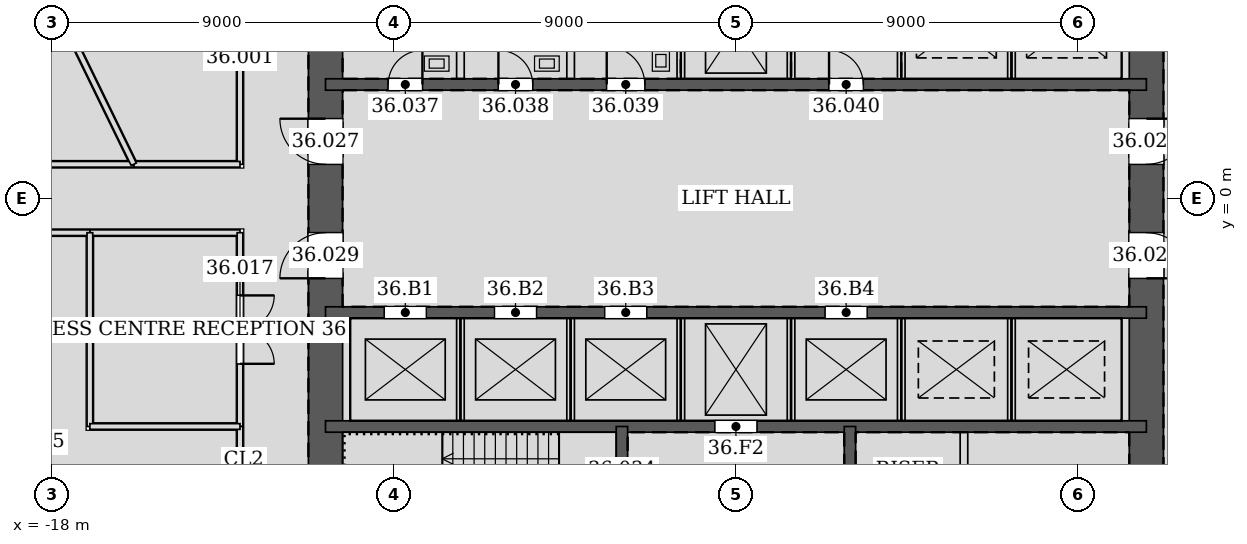
"""IFC4 building model, lengths in metres.
Left out: names, types, materials, properties, quantities, classifications, styles, units other than length and angle.
Written with IfcOpenShell. Run it as: python <this file> out.ifc"""

import sys

from ifc_helpers import new_model, si_unit, direction, frame, frame_2d, origin, place, context, subcontext, project, spatial, rectangle, extrude, element, fill, save


model = new_model("IFC4")
c1 = context("Model", 3, precision=1e-05, world=origin(), true_north=direction((0.0, 1.0)))
c2 = subcontext(c1, "Body", "Model", "MODEL_VIEW")
j1 = project(units=[si_unit("LENGTHUNIT", "METRE"), si_unit("PLANEANGLEUNIT", "RADIAN")], contexts=[c1])
p1 = place(None, origin())
s1 = spatial("IfcSite", under=j1, at=p1, CompositionType="ELEMENT")
p2 = place(p1, origin())
s2 = spatial("IfcBuilding", under=s1, at=p2, CompositionType="ELEMENT")
p3 = place(p2, frame((0.0, 0.0, 159.6)))
s3 = spatial("IfcBuildingStorey", under=s2, at=p3, CompositionType="ELEMENT", Elevation=159.6)
p4 = place(p3, frame((10.8, -10.8, 0.0), z_axis=(0.0, 0.0, 1.0), x_axis=(0.0, 1.0, 0.0)))
e1 = element("IfcWall", 1, at=p4, inside=s3, PredefinedType="SOLIDWALL", context=c2, shape_type="SweptSolid", body=[
    extrude(rectangle(XDim=21.6, YDim=0.9, at=frame_2d((10.8, 0.0))), origin(), (0.0, 0.0, 1.0), 4.2),
])
p5 = place(p4, frame((11.7, 0.0, 0.0)))
e2 = element("IfcOpeningElement", 2, at=p5, cuts=e1, PredefinedType="OPENING", context=c2, shape_type="SweptSolid", body=[
    extrude(rectangle(XDim=1.2, YDim=2.1, at=frame_2d((0.6, 1.05))), frame((0.0, 0.46, 0.0), z_axis=(0.0, -1.0, 0.0), x_axis=(1.0, 0.0, 0.0)), (0.0, 0.0, 1.0), 0.92),
])
p6 = place(p4, frame((8.7, 0.0, 0.0)))
e3 = element("IfcOpeningElement", 3, at=p6, cuts=e1, PredefinedType="OPENING", context=c2, shape_type="SweptSolid", body=[
    extrude(rectangle(XDim=1.2, YDim=2.1, at=frame_2d((0.6, 1.05))), frame((0.0, 0.46, 0.0), z_axis=(0.0, -1.0, 0.0), x_axis=(1.0, 0.0, 0.0)), (0.0, 0.0, 1.0), 0.92),
])
p7 = place(p3, frame((-10.8, 10.8, 0.0), z_axis=(0.0, 0.0, 1.0), x_axis=(0.0, -1.0, 0.0)))
e4 = element("IfcWall", 4, at=p7, inside=s3, PredefinedType="SOLIDWALL", context=c2, shape_type="SweptSolid", body=[
    extrude(rectangle(XDim=21.6, YDim=0.9, at=frame_2d((10.8, 0.0))), origin(), (0.0, 0.0, 1.0), 4.2),
])
p8 = place(p7, frame((8.7, 0.0, 0.0)))
e5 = element("IfcOpeningElement", 5, at=p8, cuts=e4, PredefinedType="OPENING", context=c2, shape_type="SweptSolid", body=[
    extrude(rectangle(XDim=1.2, YDim=2.1, at=frame_2d((0.6, 1.05))), frame((0.0, 0.46, 0.0), z_axis=(0.0, -1.0, 0.0), x_axis=(1.0, 0.0, 0.0)), (0.0, 0.0, 1.0), 0.92),
])
p9 = place(p7, frame((11.7, 0.0, 0.0)))
e6 = element("IfcOpeningElement", 6, at=p9, cuts=e4, PredefinedType="OPENING", context=c2, shape_type="SweptSolid", body=[
    extrude(rectangle(XDim=1.2, YDim=2.1, at=frame_2d((0.6, 1.05))), frame((0.0, 0.46, 0.0), z_axis=(0.0, -1.0, 0.0), x_axis=(1.0, 0.0, 0.0)), (0.0, 0.0, 1.0), 0.92),
])
p10 = place(p3, frame((-10.8, 3.0, 0.0), z_axis=(0.0, 0.0, 1.0), x_axis=(1.0, 0.0, 0.0)))
e7 = element("IfcWall", 7, at=p10, inside=s3, PredefinedType="SOLIDWALL", context=c2, shape_type="SweptSolid", body=[
    extrude(rectangle(XDim=21.6, YDim=0.3, at=frame_2d((10.8, 0.0))), origin(), (0.0, 0.0, 1.0), 4.2),
])
p11 = place(p10, frame((1.65, 0.0, 0.0)))
e8 = element("IfcOpeningElement", 8, at=p11, cuts=e7, PredefinedType="OPENING", context=c2, shape_type="SweptSolid", body=[
    extrude(rectangle(XDim=0.9, YDim=2.1, at=frame_2d((0.45, 1.05))), frame((0.0, 0.16, 0.0), z_axis=(0.0, -1.0, 0.0), x_axis=(1.0, 0.0, 0.0)), (0.0, 0.0, 1.0), 0.32),
])
p12 = place(p10, frame((4.55, 0.0, 0.0)))
e9 = element("IfcOpeningElement", 9, at=p12, cuts=e7, PredefinedType="OPENING", context=c2, shape_type="SweptSolid", body=[
    extrude(rectangle(XDim=0.9, YDim=2.1, at=frame_2d((0.45, 1.05))), frame((0.0, 0.16, 0.0), z_axis=(0.0, -1.0, 0.0), x_axis=(1.0, 0.0, 0.0)), (0.0, 0.0, 1.0), 0.32),
])
p13 = place(p10, frame((7.4, 0.0, 0.0)))
e10 = element("IfcOpeningElement", 10, at=p13, cuts=e7, PredefinedType="OPENING", context=c2, shape_type="SweptSolid", body=[
    extrude(rectangle(XDim=1.0, YDim=2.1, at=frame_2d((0.5, 1.05))), frame((0.0, 0.16, 0.0), z_axis=(0.0, -1.0, 0.0), x_axis=(1.0, 0.0, 0.0)), (0.0, 0.0, 1.0), 0.32),
])
p14 = place(p10, frame((13.25, 0.0, 0.0)))
e11 = element("IfcOpeningElement", 11, at=p14, cuts=e7, PredefinedType="OPENING", context=c2, shape_type="SweptSolid", body=[
    extrude(rectangle(XDim=0.9, YDim=2.1, at=frame_2d((0.45, 1.05))), frame((0.0, 0.16, 0.0), z_axis=(0.0, -1.0, 0.0), x_axis=(1.0, 0.0, 0.0)), (0.0, 0.0, 1.0), 0.32),
])
p15 = place(p3, frame((-10.8, -3.0, 0.0), z_axis=(0.0, 0.0, 1.0), x_axis=(1.0, 0.0, 0.0)))
e12 = element("IfcWall", 12, at=p15, inside=s3, PredefinedType="SOLIDWALL", context=c2, shape_type="SweptSolid", body=[
    extrude(rectangle(XDim=21.6, YDim=0.3, at=frame_2d((10.8, 0.0))), origin(), (0.0, 0.0, 1.0), 4.2),
])
p16 = place(p15, frame((1.55, 0.0, 0.0)))
e13 = element("IfcOpeningElement", 13, at=p16, cuts=e12, PredefinedType="OPENING", context=c2, shape_type="SweptSolid", body=[
    extrude(rectangle(XDim=1.1, YDim=2.1, at=frame_2d((0.55, 1.05))), frame((0.0, 0.16, 0.0), z_axis=(0.0, -1.0, 0.0), x_axis=(1.0, 0.0, 0.0)), (0.0, 0.0, 1.0), 0.32),
])
p17 = place(p15, frame((4.45, 0.0, 0.0)))
e14 = element("IfcOpeningElement", 14, at=p17, cuts=e12, PredefinedType="OPENING", context=c2, shape_type="SweptSolid", body=[
    extrude(rectangle(XDim=1.1, YDim=2.1, at=frame_2d((0.55, 1.05))), frame((0.0, 0.16, 0.0), z_axis=(0.0, -1.0, 0.0), x_axis=(1.0, 0.0, 0.0)), (0.0, 0.0, 1.0), 0.32),
])
p18 = place(p15, frame((7.35, 0.0, 0.0)))
e15 = element("IfcOpeningElement", 15, at=p18, cuts=e12, PredefinedType="OPENING", context=c2, shape_type="SweptSolid", body=[
    extrude(rectangle(XDim=1.1, YDim=2.1, at=frame_2d((0.55, 1.05))), frame((0.0, 0.16, 0.0), z_axis=(0.0, -1.0, 0.0), x_axis=(1.0, 0.0, 0.0)), (0.0, 0.0, 1.0), 0.32),
])
p19 = place(p15, frame((13.15, 0.0, 0.0)))
e16 = element("IfcOpeningElement", 16, at=p19, cuts=e12, PredefinedType="OPENING", context=c2, shape_type="SweptSolid", body=[
    extrude(rectangle(XDim=1.1, YDim=2.1, at=frame_2d((0.55, 1.05))), frame((0.0, 0.16, 0.0), z_axis=(0.0, -1.0, 0.0), x_axis=(1.0, 0.0, 0.0)), (0.0, 0.0, 1.0), 0.32),
])
p20 = place(p3, frame((-10.8, -6.0, 0.0), z_axis=(0.0, 0.0, 1.0), x_axis=(1.0, 0.0, 0.0)))
e17 = element("IfcWall", 17, at=p20, inside=s3, PredefinedType="SOLIDWALL", context=c2, shape_type="SweptSolid", body=[
    extrude(rectangle(XDim=21.6, YDim=0.3, at=frame_2d((10.8, 0.0))), origin(), (0.0, 0.0, 1.0), 4.2),
])
p21 = place(p20, frame((10.25, 0.0, 0.0)))
e18 = element("IfcOpeningElement", 18, at=p21, cuts=e17, PredefinedType="OPENING", context=c2, shape_type="SweptSolid", body=[
    extrude(rectangle(XDim=1.1, YDim=2.1, at=frame_2d((0.55, 1.05))), frame((0.0, 0.16, 0.0), z_axis=(0.0, -1.0, 0.0), x_axis=(1.0, 0.0, 0.0)), (0.0, 0.0, 1.0), 0.32),
])
p22 = place(p3, frame((-3.0, -6.0, 0.0), z_axis=(0.0, 0.0, 1.0), x_axis=(0.0, -1.0, 0.0)))
e19 = element("IfcWall", 19, at=p22, inside=s3, PredefinedType="SOLIDWALL", context=c2, shape_type="SweptSolid", body=[
    extrude(rectangle(XDim=4.8, YDim=0.3, at=frame_2d((2.4, 0.0))), origin(), (0.0, 0.0, 1.0), 4.2),
])
p23 = place(p22, frame((1.75, 0.0, 0.0)))
e20 = element("IfcOpeningElement", 20, at=p23, cuts=e19, PredefinedType="OPENING", context=c2, shape_type="SweptSolid", body=[
    extrude(rectangle(XDim=1.0, YDim=2.1, at=frame_2d((0.5, 1.05))), frame((0.0, 0.16, 0.0), z_axis=(0.0, -1.0, 0.0), x_axis=(1.0, 0.0, 0.0)), (0.0, 0.0, 1.0), 0.32),
])
p24 = place(p3, frame((3.0, -6.0, 0.0), z_axis=(0.0, 0.0, 1.0), x_axis=(0.0, -1.0, 0.0)))
e21 = element("IfcWall", 21, at=p24, inside=s3, PredefinedType="SOLIDWALL", context=c2, shape_type="SweptSolid", body=[
    extrude(rectangle(XDim=4.8, YDim=0.3, at=frame_2d((2.4, 0.0))), origin(), (0.0, 0.0, 1.0), 4.2),
])
p25 = place(p3, frame((-13.05, 8.701, 0.0), z_axis=(0.0, 0.0, 1.0), x_axis=(0.0, -1.0, 0.0)))
e22 = element("IfcWall", 22, at=p25, inside=s3, PredefinedType="PARTITIONING", context=c2, shape_type="SweptSolid", body=[
    extrude(rectangle(XDim=7.801, YDim=0.15, at=frame_2d((3.9, 0.0))), origin(), (0.0, 0.0, 1.0), 4.035),
])
p26 = place(p25, frame((3.4, 0.0, 0.0)))
e23 = element("IfcOpeningElement", 23, at=p26, cuts=e22, PredefinedType="OPENING", context=c2, shape_type="SweptSolid", body=[
    extrude(rectangle(XDim=1.0, YDim=2.1, at=frame_2d((0.5, 1.05))), frame((0.0, 0.085, 0.0), z_axis=(0.0, -1.0, 0.0), x_axis=(1.0, 0.0, 0.0)), (0.0, 0.0, 1.0), 0.17),
])
p27 = place(p3, frame((-13.05, 0.9, 0.0), z_axis=(0.0, 0.0, 1.0), x_axis=(-1.0, 0.0, 0.0)))
e24 = element("IfcWall", 24, at=p27, inside=s3, PredefinedType="PARTITIONING", context=c2, shape_type="SweptSolid", body=[
    extrude(rectangle(XDim=2.797, YDim=0.15, at=frame_2d((1.398, 0.0))), origin(), (0.0, 0.0, 1.0), 3.491),
])
p28 = place(p3, frame((-17.001, -0.9, 0.0), z_axis=(0.0, 0.0, 1.0), x_axis=(1.0, 0.0, 0.0)))
e25 = element("IfcWall", 25, at=p28, inside=s3, PredefinedType="PARTITIONING", context=c2, shape_type="SweptSolid", body=[
    extrude(rectangle(XDim=3.951, YDim=0.15, at=frame_2d((1.976, 0.0))), origin(), (0.0, 0.0, 1.0), 3.491),
])
p29 = place(p3, frame((-13.05, -0.9, 0.0), z_axis=(0.0, 0.0, 1.0), x_axis=(0.0, -1.0, 0.0)))
e26 = element("IfcWall", 26, at=p29, inside=s3, PredefinedType="PARTITIONING", context=c2, shape_type="SweptSolid", body=[
    extrude(rectangle(XDim=5.101, YDim=0.15, at=frame_2d((2.551, 0.0))), origin(), (0.0, 0.0, 1.0), 4.035),
])
p30 = place(p29, frame((1.65, 0.0, 0.0)))
e27 = element("IfcOpeningElement", 27, at=p30, cuts=e26, PredefinedType="OPENING", context=c2, shape_type="SweptSolid", body=[
    extrude(rectangle(XDim=1.8, YDim=2.4, at=frame_2d((0.9, 1.2))), frame((0.0, 0.085, 0.0), z_axis=(0.0, -1.0, 0.0), x_axis=(1.0, 0.0, 0.0)), (0.0, 0.0, 1.0), 0.17),
])
p31 = place(p3, frame((-15.844, 0.9, 0.0), z_axis=(0.0, 0.0, 1.0), x_axis=(-1.0, 0.0, 0.0)))
e28 = element("IfcWall", 28, at=p31, inside=s3, PredefinedType="PARTITIONING", context=c2, shape_type="SweptSolid", body=[
    extrude(rectangle(XDim=7.639, YDim=0.15, at=frame_2d((3.82, 0.0))), origin(), (0.0, 0.0, 1.0), 3.423),
])
p32 = place(p31, frame((2.703, 0.0, 0.0)))
e29 = element("IfcOpeningElement", 29, at=p32, cuts=e28, PredefinedType="OPENING", context=c2, shape_type="SweptSolid", body=[
    extrude(rectangle(XDim=1.8, YDim=2.4, at=frame_2d((0.9, 1.2))), frame((0.0, 0.085, 0.0), z_axis=(0.0, -1.0, 0.0), x_axis=(1.0, 0.0, 0.0)), (0.0, 0.0, 1.0), 0.17),
])
p33 = place(p3, frame((-23.484, -0.9, 0.0), z_axis=(0.0, 0.0, 1.0), x_axis=(1.0, 0.0, 0.0)))
e30 = element("IfcWall", 30, at=p33, inside=s3, PredefinedType="PARTITIONING", context=c2, shape_type="SweptSolid", body=[
    extrude(rectangle(XDim=6.485, YDim=0.15, at=frame_2d((3.242, 0.0))), origin(), (0.0, 0.0, 1.0), 3.423),
])
p34 = place(p33, frame((2.224, 0.0, 0.0)))
e31 = element("IfcOpeningElement", 31, at=p34, cuts=e30, PredefinedType="OPENING", context=c2, shape_type="SweptSolid", body=[
    extrude(rectangle(XDim=1.8, YDim=2.4, at=frame_2d((0.9, 1.2))), frame((0.0, 0.085, 0.0), z_axis=(0.0, -1.0, 0.0), x_axis=(1.0, 0.0, 0.0)), (0.0, 0.0, 1.0), 0.17),
])
p35 = place(p3, frame((-13.05, -5.999, 0.0), z_axis=(0.0, 0.0, 1.0), x_axis=(0.0, -1.0, 0.0)))
e32 = element("IfcWall", 32, at=p35, inside=s3, PredefinedType="PARTITIONING", context=c2, shape_type="SweptSolid", body=[
    extrude(rectangle(XDim=2.002, YDim=0.15, at=frame_2d((1.001, 0.0))), origin(), (0.0, 0.0, 1.0), 4.035),
])
p36 = place(p3, frame((-19.65, 8.7, 0.0), z_axis=(0.0, 0.0, 1.0), x_axis=(0.438358227548, -0.898800347319, 0.0)))
e33 = element("IfcWall", 33, at=p36, inside=s3, PredefinedType="PARTITIONING", context=c2, shape_type="SweptSolid", body=[
    extrude(rectangle(XDim=8.678, YDim=0.15, at=frame_2d((4.339, 0.0))), origin(), (0.0, 0.0, 1.0), 3.423),
])
p37 = place(p3, frame((-17.0, -0.9, 0.0), z_axis=(0.0, 0.0, 1.0), x_axis=(0.0, -1.0, 0.0)))
e34 = element("IfcWall", 34, at=p37, inside=s3, PredefinedType="PARTITIONING", context=c2, shape_type="SweptSolid", body=[
    extrude(rectangle(XDim=5.1, YDim=0.15, at=frame_2d((2.55, 0.0))), origin(), (0.0, 0.0, 1.0), 4.035),
])
p38 = place(p3, frame((-17.0, -6.0, 0.0), z_axis=(0.0, 0.0, 1.0), x_axis=(1.0, 0.0, 0.0)))
e35 = element("IfcWall", 35, at=p38, inside=s3, PredefinedType="PARTITIONING", context=c2, shape_type="SweptSolid", body=[
    extrude(rectangle(XDim=3.95, YDim=0.15, at=frame_2d((1.975, 0.0))), origin(), (0.0, 0.0, 1.0), 3.491),
])
for number, where, z_axis, x_axis in (
    (36, (-7.25, 3.15, 0.0), (0.0, 0.0, 1.0), (0.0, 1.0, 0.0)),
    (37, (-4.35, 3.15, 0.0), (0.0, 0.0, 1.0), (0.0, 1.0, 0.0)),
    (38, (-1.45, 3.15, 0.0), (0.0, 0.0, 1.0), (0.0, 1.0, 0.0)),
    (39, (1.45, 3.15, 0.0), (0.0, 0.0, 1.0), (0.0, 1.0, 0.0)),
    (40, (4.35, 3.15, 0.0), (0.0, 0.0, 1.0), (0.0, 1.0, 0.0)),
):
    element("IfcWall", number, at=place(p3, frame(where, z_axis=z_axis, x_axis=x_axis)), inside=s3, PredefinedType="PARTITIONING", context=c2, shape_type="SweptSolid", body=[
        extrude(rectangle(XDim=2.7, YDim=0.2, at=frame_2d((1.35, 0.0))), origin(), (0.0, 0.0, 1.0), 4.035),
    ])
for number, where, z_axis, x_axis in (
    (41, (7.25, 3.15, 0.0), (0.0, 0.0, 1.0), (0.0, 1.0, 0.0)),
    (42, (-7.25, -5.85, 0.0), (0.0, 0.0, 1.0), (0.0, 1.0, 0.0)),
    (43, (-4.35, -5.85, 0.0), (0.0, 0.0, 1.0), (0.0, 1.0, 0.0)),
    (44, (-1.45, -5.85, 0.0), (0.0, 0.0, 1.0), (0.0, 1.0, 0.0)),
    (45, (1.45, -5.85, 0.0), (0.0, 0.0, 1.0), (0.0, 1.0, 0.0)),
    (46, (4.35, -5.85, 0.0), (0.0, 0.0, 1.0), (0.0, 1.0, 0.0)),
    (47, (7.25, -5.85, 0.0), (0.0, 0.0, 1.0), (0.0, 1.0, 0.0)),
):
    element("IfcWall", number, at=place(p3, frame(where, z_axis=z_axis, x_axis=x_axis)), inside=s3, PredefinedType="PARTITIONING", context=c2, shape_type="SweptSolid", body=[
        extrude(rectangle(XDim=2.7, YDim=0.2, at=frame_2d((1.35, 0.0))), origin(), (0.0, 0.0, 1.0), 4.2),
    ])
p39 = place(p3, frame((6.0, -10.35, 0.0), z_axis=(0.0, 0.0, 1.0), x_axis=(0.0, 1.0, 0.0)))
e48 = element("IfcWall", 48, at=p39, inside=s3, PredefinedType="PARTITIONING", context=c2, shape_type="SweptSolid", body=[
    extrude(rectangle(XDim=4.2, YDim=0.2, at=frame_2d((2.1, 0.0))), origin(), (0.0, 0.0, 1.0), 4.035),
])
p40 = place(p39, frame((0.3, 0.0, 0.0)))
e49 = element("IfcOpeningElement", 49, at=p40, cuts=e48, PredefinedType="OPENING", context=c2, shape_type="SweptSolid", body=[
    extrude(rectangle(XDim=0.9, YDim=2.1, at=frame_2d((0.45, 1.05))), frame((0.0, 0.11, 0.0), z_axis=(0.0, -1.0, 0.0), x_axis=(1.0, 0.0, 0.0)), (0.0, 0.0, 1.0), 0.22),
])
p41 = place(p30, origin())
e50 = element("IfcDoor", 50, at=p41, inside=s3, OperationType="DOUBLE_DOOR_SINGLE_SWING", PredefinedType="DOOR", context=c2, shape_type="SweptSolid", body=[
    extrude(rectangle(XDim=1.8, YDim=2.4, at=frame_2d((0.9, 1.2))), frame((0.0, 0.025, 0.0), z_axis=(0.0, -1.0, 0.0), x_axis=(1.0, 0.0, 0.0)), (0.0, 0.0, 1.0), 0.05),
])
fill(e27, e50)
p42 = place(p5, frame((1.2, 0.0, 0.0), z_axis=(0.0, 0.0, 1.0), x_axis=(-1.0, 0.0, 0.0)))
e51 = element("IfcDoor", 51, at=p42, inside=s3, OperationType="SINGLE_SWING_LEFT", PredefinedType="DOOR", context=c2, shape_type="SweptSolid", body=[
    extrude(rectangle(XDim=1.2, YDim=2.1, at=frame_2d((0.6, 1.05))), frame((0.0, 0.025, 0.0), z_axis=(0.0, -1.0, 0.0), x_axis=(1.0, 0.0, 0.0)), (0.0, 0.0, 1.0), 0.05),
])
fill(e2, e51)
p43 = place(p8, frame((1.2, 0.0, 0.0), z_axis=(0.0, 0.0, 1.0), x_axis=(-1.0, 0.0, 0.0)))
e52 = element("IfcDoor", 52, at=p43, inside=s3, OperationType="SINGLE_SWING_RIGHT", PredefinedType="DOOR", context=c2, shape_type="SweptSolid", body=[
    extrude(rectangle(XDim=1.2, YDim=2.1, at=frame_2d((0.6, 1.05))), frame((0.0, 0.025, 0.0), z_axis=(0.0, -1.0, 0.0), x_axis=(1.0, 0.0, 0.0)), (0.0, 0.0, 1.0), 0.05),
])
fill(e5, e52)
p44 = place(p6, frame((1.2, 0.0, 0.0), z_axis=(0.0, 0.0, 1.0), x_axis=(-1.0, 0.0, 0.0)))
e53 = element("IfcDoor", 53, at=p44, inside=s3, OperationType="SINGLE_SWING_RIGHT", PredefinedType="DOOR", context=c2, shape_type="SweptSolid", body=[
    extrude(rectangle(XDim=1.2, YDim=2.1, at=frame_2d((0.6, 1.05))), frame((0.0, 0.025, 0.0), z_axis=(0.0, -1.0, 0.0), x_axis=(1.0, 0.0, 0.0)), (0.0, 0.0, 1.0), 0.05),
])
fill(e3, e53)
p45 = place(p9, frame((1.2, 0.0, 0.0), z_axis=(0.0, 0.0, 1.0), x_axis=(-1.0, 0.0, 0.0)))
e54 = element("IfcDoor", 54, at=p45, inside=s3, OperationType="SINGLE_SWING_LEFT", PredefinedType="DOOR", context=c2, shape_type="SweptSolid", body=[
    extrude(rectangle(XDim=1.2, YDim=2.1, at=frame_2d((0.6, 1.05))), frame((0.0, 0.025, 0.0), z_axis=(0.0, -1.0, 0.0), x_axis=(1.0, 0.0, 0.0)), (0.0, 0.0, 1.0), 0.05),
])
fill(e6, e54)
p46 = place(p11, origin())
e55 = element("IfcDoor", 55, at=p46, inside=s3, OperationType="SINGLE_SWING_RIGHT", PredefinedType="DOOR", context=c2, shape_type="SweptSolid", body=[
    extrude(rectangle(XDim=0.9, YDim=2.1, at=frame_2d((0.45, 1.05))), frame((0.0, 0.025, 0.0), z_axis=(0.0, -1.0, 0.0), x_axis=(1.0, 0.0, 0.0)), (0.0, 0.0, 1.0), 0.05),
])
fill(e8, e55)
p47 = place(p12, origin())
e56 = element("IfcDoor", 56, at=p47, inside=s3, OperationType="SINGLE_SWING_LEFT", PredefinedType="DOOR", context=c2, shape_type="SweptSolid", body=[
    extrude(rectangle(XDim=0.9, YDim=2.1, at=frame_2d((0.45, 1.05))), frame((0.0, 0.025, 0.0), z_axis=(0.0, -1.0, 0.0), x_axis=(1.0, 0.0, 0.0)), (0.0, 0.0, 1.0), 0.05),
])
fill(e9, e56)
p48 = place(p13, origin())
e57 = element("IfcDoor", 57, at=p48, inside=s3, OperationType="SINGLE_SWING_LEFT", PredefinedType="DOOR", context=c2, shape_type="SweptSolid", body=[
    extrude(rectangle(XDim=1.0, YDim=2.1, at=frame_2d((0.5, 1.05))), frame((0.0, 0.025, 0.0), z_axis=(0.0, -1.0, 0.0), x_axis=(1.0, 0.0, 0.0)), (0.0, 0.0, 1.0), 0.05),
])
fill(e10, e57)
p49 = place(p14, origin())
e58 = element("IfcDoor", 58, at=p49, inside=s3, OperationType="SINGLE_SWING_LEFT", PredefinedType="DOOR", context=c2, shape_type="SweptSolid", body=[
    extrude(rectangle(XDim=0.9, YDim=2.1, at=frame_2d((0.45, 1.05))), frame((0.0, 0.025, 0.0), z_axis=(0.0, -1.0, 0.0), x_axis=(1.0, 0.0, 0.0)), (0.0, 0.0, 1.0), 0.05),
])
fill(e11, e58)
p50 = place(p16, origin())
e59 = element("IfcDoor", 59, at=p50, inside=s3, OperationType="DOUBLE_DOOR_SLIDING", PredefinedType="DOOR", context=c2, shape_type="SweptSolid", body=[
    extrude(rectangle(XDim=1.1, YDim=2.1, at=frame_2d((0.55, 1.05))), frame((0.0, 0.025, 0.0), z_axis=(0.0, -1.0, 0.0), x_axis=(1.0, 0.0, 0.0)), (0.0, 0.0, 1.0), 0.05),
])
fill(e13, e59)
p51 = place(p17, origin())
e60 = element("IfcDoor", 60, at=p51, inside=s3, OperationType="DOUBLE_DOOR_SLIDING", PredefinedType="DOOR", context=c2, shape_type="SweptSolid", body=[
    extrude(rectangle(XDim=1.1, YDim=2.1, at=frame_2d((0.55, 1.05))), frame((0.0, 0.025, 0.0), z_axis=(0.0, -1.0, 0.0), x_axis=(1.0, 0.0, 0.0)), (0.0, 0.0, 1.0), 0.05),
])
fill(e14, e60)
p52 = place(p18, origin())
e61 = element("IfcDoor", 61, at=p52, inside=s3, OperationType="DOUBLE_DOOR_SLIDING", PredefinedType="DOOR", context=c2, shape_type="SweptSolid", body=[
    extrude(rectangle(XDim=1.1, YDim=2.1, at=frame_2d((0.55, 1.05))), frame((0.0, 0.025, 0.0), z_axis=(0.0, -1.0, 0.0), x_axis=(1.0, 0.0, 0.0)), (0.0, 0.0, 1.0), 0.05),
])
fill(e15, e61)
p53 = place(p21, origin())
e62 = element("IfcDoor", 62, at=p53, inside=s3, OperationType="DOUBLE_DOOR_SLIDING", PredefinedType="DOOR", context=c2, shape_type="SweptSolid", body=[
    extrude(rectangle(XDim=1.1, YDim=2.1, at=frame_2d((0.55, 1.05))), frame((0.0, 0.025, 0.0), z_axis=(0.0, -1.0, 0.0), x_axis=(1.0, 0.0, 0.0)), (0.0, 0.0, 1.0), 0.05),
])
fill(e18, e62)
p54 = place(p19, origin())
e63 = element("IfcDoor", 63, at=p54, inside=s3, OperationType="DOUBLE_DOOR_SLIDING", PredefinedType="DOOR", context=c2, shape_type="SweptSolid", body=[
    extrude(rectangle(XDim=1.1, YDim=2.1, at=frame_2d((0.55, 1.05))), frame((0.0, 0.025, 0.0), z_axis=(0.0, -1.0, 0.0), x_axis=(1.0, 0.0, 0.0)), (0.0, 0.0, 1.0), 0.05),
])
fill(e16, e63)
save(model, sys.argv[1])
